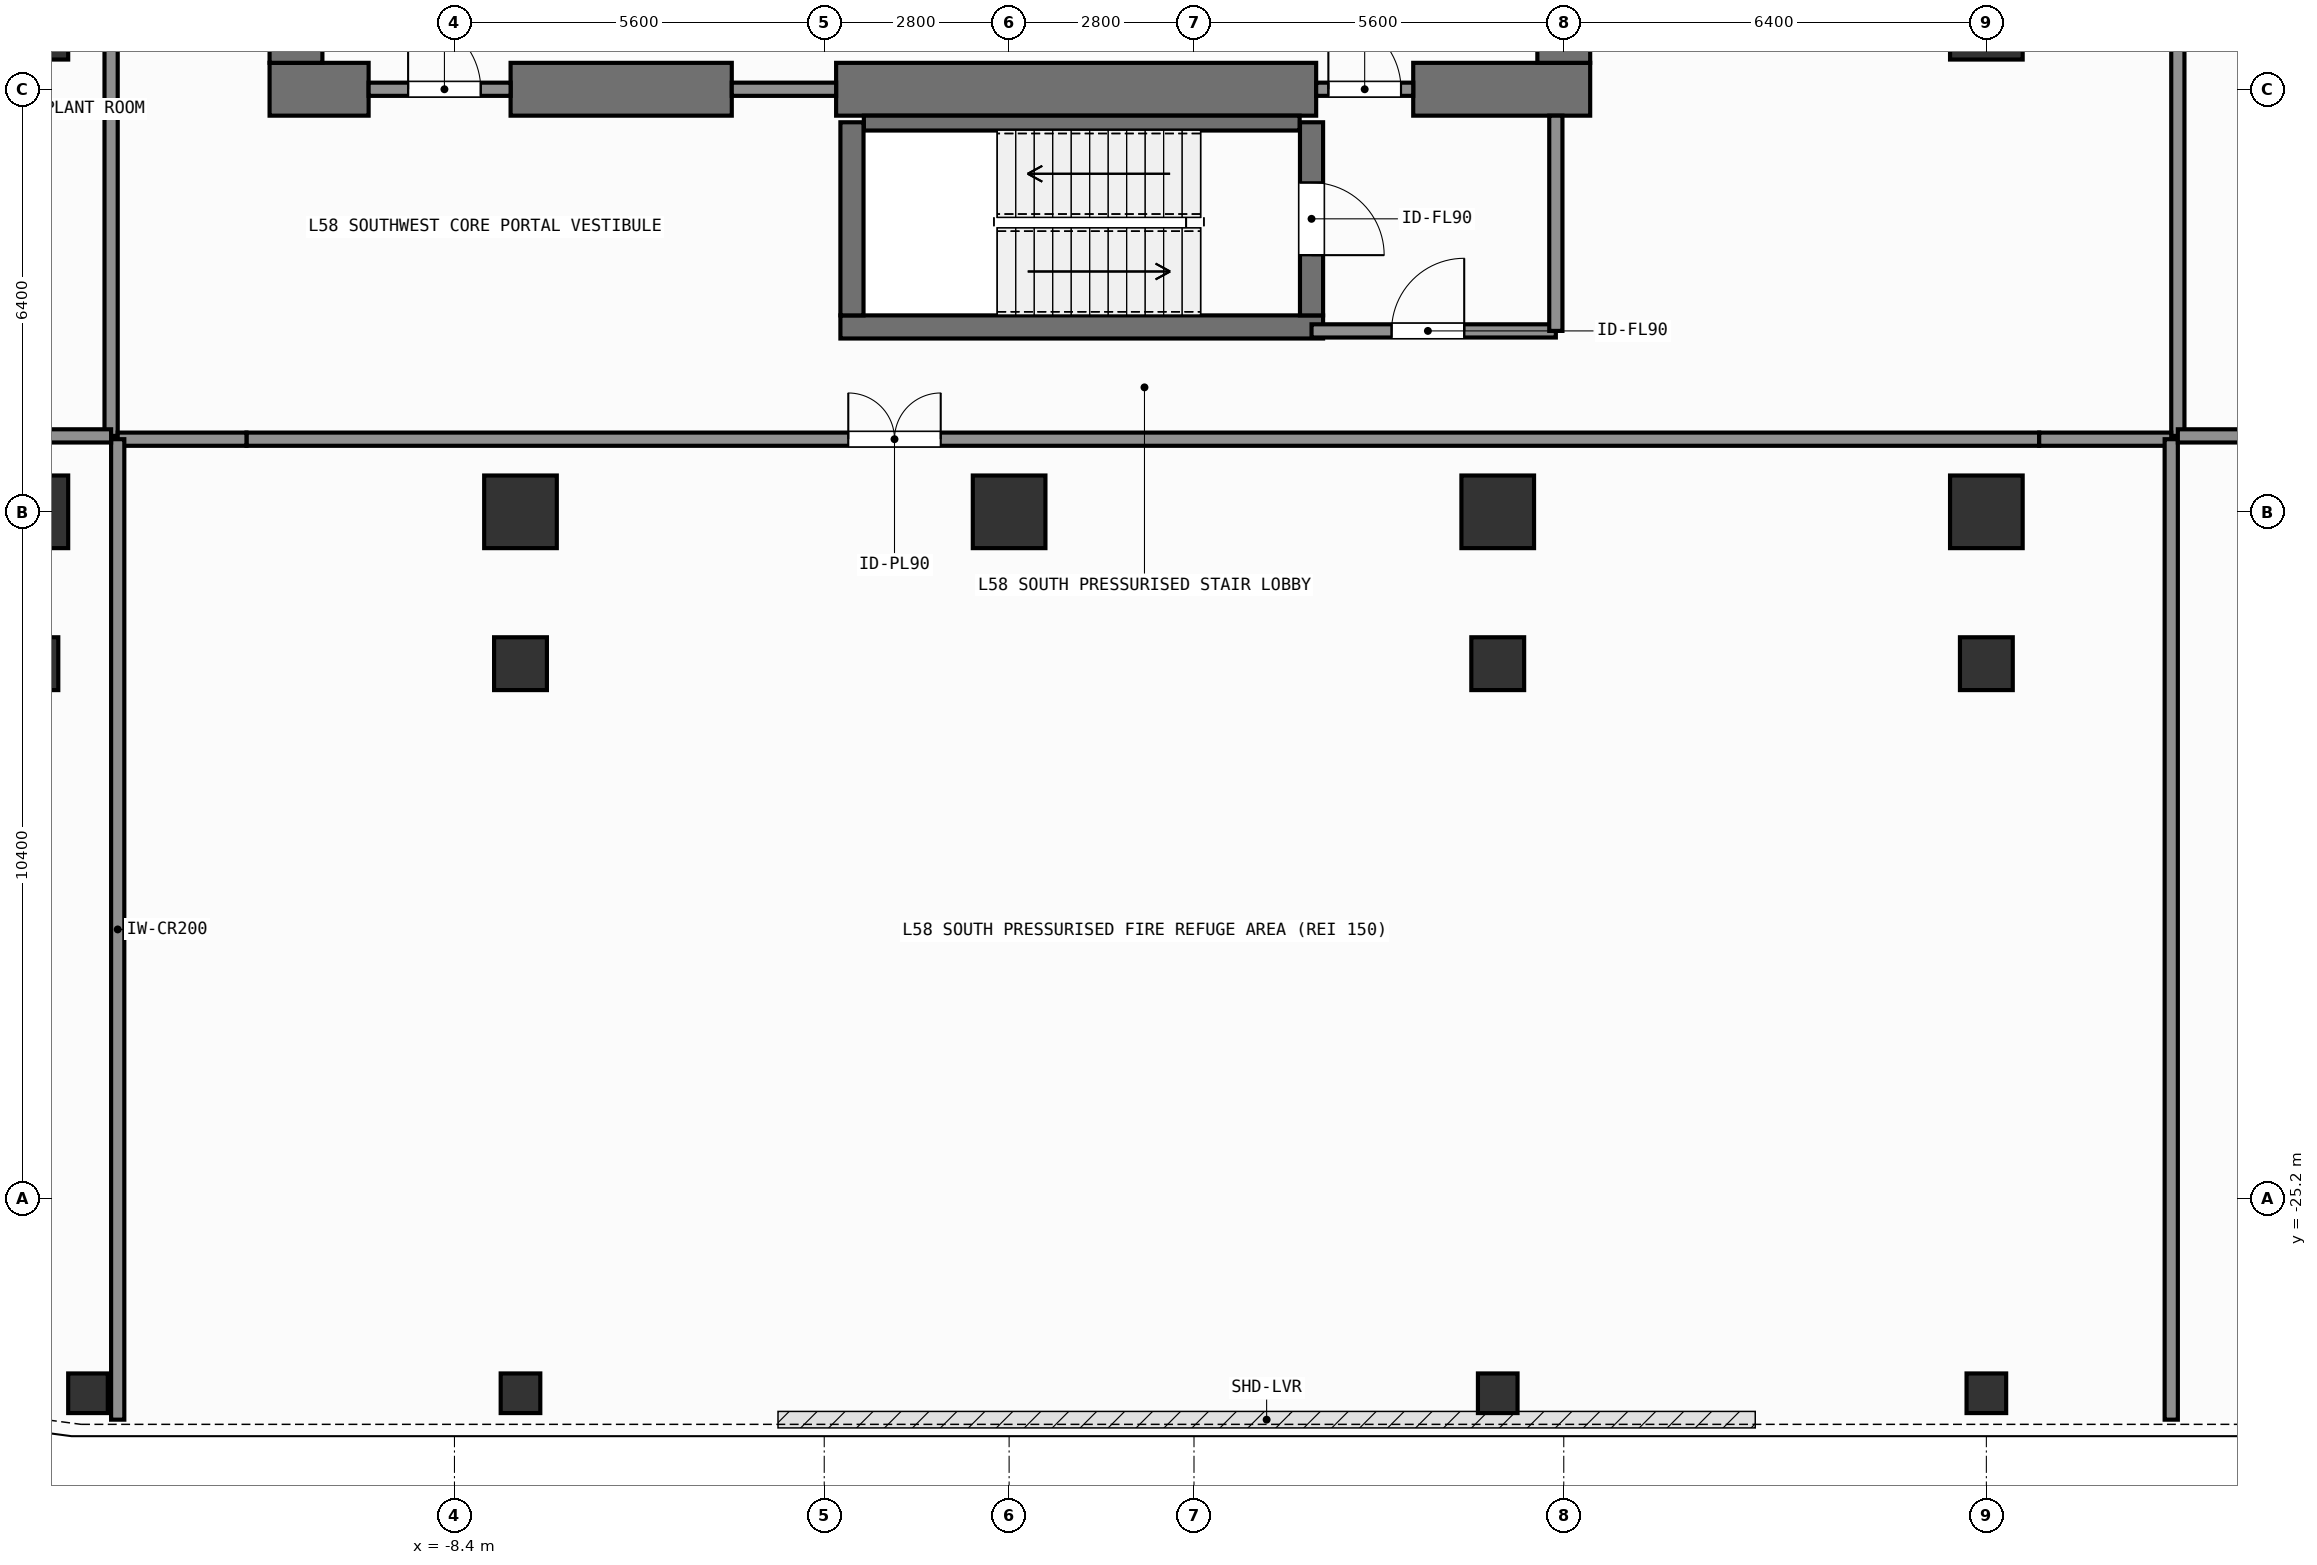
"""IFC4 building model, lengths in metres.
Left out: names, types, materials, properties, quantities, classifications, styles, units other than length and angle.
Written with IfcOpenShell. Run it as: python <this file> out.ifc"""

import sys

from ifc_helpers import new_model, si_unit, direction, frame, frame_2d, origin, origin_2d, place, context, subcontext, project, spatial, rectangle, hollow_rectangle, extrude, element, fill, save


model = new_model("IFC4")
c1 = context("Model", 3, precision=1e-05, world=origin(), true_north=direction((0.0, 1.0)))
c2 = subcontext(c1, "Body", "Model", "MODEL_VIEW")
j1 = project(units=[si_unit("LENGTHUNIT", "METRE"), si_unit("PLANEANGLEUNIT", "RADIAN")], contexts=[c1])
p1 = place(None, origin())
s1 = spatial("IfcSite", under=j1, at=p1, CompositionType="ELEMENT")
p2 = place(p1, origin())
s2 = spatial("IfcBuilding", under=s1, at=p2, CompositionType="ELEMENT")
p3 = place(p2, frame((0.0, 0.0, 235.2)))
s3 = spatial("IfcBuildingStorey", under=s2, at=p3, CompositionType="ELEMENT", Elevation=235.2)
p4 = place(p3, frame((-11.2, -8.4, 0.0), z_axis=(0.0, 0.0, 1.0), x_axis=(1.0, 0.0, 0.0)))
e1 = element("IfcWall", 1, at=p4, inside=s3, PredefinedType="SHEAR", context=c2, shape_type="SweptSolid", body=[
    extrude(rectangle(XDim=1.5, YDim=0.8, at=frame_2d((0.75, 0.0))), origin(), (0.0, 0.0, 1.0), 7.8),
])
p5 = place(p3, frame((-7.55, -8.4, 0.0), z_axis=(0.0, 0.0, 1.0), x_axis=(1.0, 0.0, 0.0)))
e2 = element("IfcWall", 2, at=p5, inside=s3, PredefinedType="SHEAR", context=c2, shape_type="SweptSolid", body=[
    extrude(rectangle(XDim=3.35, YDim=0.8, at=frame_2d((1.675, 0.0))), origin(), (0.0, 0.0, 1.0), 7.8),
])
p6 = place(p3, frame((-2.62, -8.4, 0.0), z_axis=(0.0, 0.0, 1.0), x_axis=(1.0, 0.0, 0.0)))
e3 = element("IfcWall", 3, at=p6, inside=s3, PredefinedType="SHEAR", context=c2, shape_type="SweptSolid", body=[
    extrude(rectangle(XDim=7.27, YDim=0.8, at=frame_2d((3.635, 0.0))), origin(), (0.0, 0.0, 1.0), 7.8),
])
p7 = place(p3, frame((6.12, -8.4, 0.0), z_axis=(0.0, 0.0, 1.0), x_axis=(1.0, 0.0, 0.0)))
e4 = element("IfcWall", 4, at=p7, inside=s3, PredefinedType="SHEAR", context=c2, shape_type="SweptSolid", body=[
    extrude(rectangle(XDim=2.68, YDim=0.8, at=frame_2d((1.34, 0.0))), origin(), (0.0, 0.0, 1.0), 7.8),
])
p8 = place(p3, frame((-10.8, -8.0, 0.0), z_axis=(0.0, 0.0, 1.0), x_axis=(0.0, 1.0, 0.0)))
e5 = element("IfcWall", 5, at=p8, inside=s3, PredefinedType="SHEAR", context=c2, shape_type="SweptSolid", body=[
    extrude(rectangle(XDim=16.0, YDim=0.8, at=frame_2d((8.0, 0.0))), origin(), (0.0, 0.0, 1.0), 7.8),
])
p9 = place(p3, frame((8.4, -8.0, 0.0), z_axis=(0.0, 0.0, 1.0), x_axis=(0.0, 1.0, 0.0)))
e6 = element("IfcWall", 6, at=p9, inside=s3, PredefinedType="SHEAR", context=c2, shape_type="SweptSolid", body=[
    extrude(rectangle(XDim=2.175, YDim=0.8, at=frame_2d((1.087, 0.0))), origin(), (0.0, 0.0, 1.0), 7.8),
])
p10 = place(p3, frame((-2.555, -12.0, 0.0), z_axis=(0.0, 0.0, 1.0), x_axis=(1.0, 0.0, 0.0)))
e7 = element("IfcWall", 7, at=p10, inside=s3, PredefinedType="SHEAR", context=c2, shape_type="SweptSolid", body=[
    extrude(rectangle(XDim=7.31, YDim=0.35, at=frame_2d((3.655, 0.0))), origin(), (0.0, 0.0, 1.0), 7.8),
])
p11 = place(p3, frame((-2.2, -8.913, 0.0), z_axis=(0.0, 0.0, 1.0), x_axis=(1.0, 0.0, 0.0)))
e8 = element("IfcWall", 8, at=p11, inside=s3, PredefinedType="SHEAR", context=c2, shape_type="SweptSolid", body=[
    extrude(rectangle(XDim=6.6, YDim=0.225, at=frame_2d((3.3, 0.0))), origin(), (0.0, 0.0, 1.0), 7.8),
])
p12 = place(p3, frame((-2.38, -11.825, 0.0), z_axis=(0.0, 0.0, 1.0), x_axis=(0.0, 1.0, 0.0)))
e9 = element("IfcWall", 9, at=p12, inside=s3, PredefinedType="SHEAR", context=c2, shape_type="SweptSolid", body=[
    extrude(rectangle(XDim=2.925, YDim=0.35, at=frame_2d((1.462, 0.0))), origin(), (0.0, 0.0, 1.0), 7.8),
])
p13 = place(p3, frame((4.58, -8.9, 0.0), z_axis=(0.0, 0.0, 1.0), x_axis=(0.0, -1.0, 0.0)))
e10 = element("IfcWall", 10, at=p13, inside=s3, PredefinedType="SHEAR", context=c2, shape_type="SweptSolid", body=[
    extrude(rectangle(XDim=2.925, YDim=0.35, at=frame_2d((1.462, 0.0))), origin(), (0.0, 0.0, 1.0), 7.8),
])
p14 = place(p13, frame((0.913, 0.0, 0.0)))
e11 = element("IfcOpeningElement", 11, at=p14, cuts=e10, PredefinedType="OPENING", context=c2, shape_type="SweptSolid", body=[
    extrude(rectangle(XDim=1.1, YDim=2.15, at=frame_2d((0.55, 1.075))), frame((0.0, 0.185, 0.0), z_axis=(0.0, -1.0, 0.0), x_axis=(1.0, 0.0, 0.0)), (0.0, 0.0, 1.0), 0.37),
])
for number, where, z_axis, x_axis in (
    (12, (-14.8, -14.8, 0.0), (0.0, 0.0, 1.0), (1.0, 0.0, 0.0)),
    (13, (-7.4, -14.8, 0.0), (0.0, 0.0, 1.0), (1.0, 0.0, 0.0)),
    (14, (0.0, -14.8, 0.0), (0.0, 0.0, 1.0), (1.0, 0.0, 0.0)),
    (15, (7.4, -14.8, 0.0), (0.0, 0.0, 1.0), (1.0, 0.0, 0.0)),
    (16, (14.8, -14.8, 0.0), (0.0, 0.0, 1.0), (1.0, 0.0, 0.0)),
    (17, (-14.8, -7.4, 0.0), (0.0, 0.0, 1.0), (1.0, 0.0, 0.0)),
    (18, (14.8, -7.4, 0.0), (0.0, 0.0, 1.0), (1.0, 0.0, 0.0)),
):
    element("IfcColumn", number, at=place(p3, frame(where, z_axis=z_axis, x_axis=x_axis)), inside=s3, PredefinedType="COLUMN", context=c2, shape_type="SweptSolid", body=[
        extrude(rectangle(XDim=1.1, YDim=1.1, at=origin_2d()), origin(), (0.0, 0.0, 1.0), 7.8),
    ])
for number, where, z_axis, x_axis in (
    (19, (-14.8, -17.1, 0.0), (0.0, 0.0, 1.0), (1.0, 0.0, 0.0)),
    (20, (-7.4, -17.1, 0.0), (0.0, 0.0, 1.0), (1.0, 0.0, 0.0)),
    (21, (7.4, -17.1, 0.0), (0.0, 0.0, 1.0), (1.0, 0.0, 0.0)),
    (22, (14.8, -17.1, 0.0), (0.0, 0.0, 1.0), (1.0, 0.0, 0.0)),
):
    element("IfcColumn", number, at=place(p3, frame(where, z_axis=z_axis, x_axis=x_axis)), inside=s3, PredefinedType="COLUMN", context=c2, shape_type="SweptSolid", body=[
        extrude(hollow_rectangle(XDim=0.8, YDim=0.8, WallThickness=0.036, at=origin_2d()), origin(), (0.0, 0.0, 1.0), 7.8),
    ])
for number, where, z_axis, x_axis in (
    (23, (-13.95, -28.15, 0.0), (0.0, 0.0, 1.0), (1.0, 0.0, 0.0)),
    (24, (-7.4, -28.15, 0.0), (0.0, 0.0, 1.0), (1.0, 0.0, 0.0)),
    (25, (7.4, -28.15, 0.0), (0.0, 0.0, 1.0), (1.0, 0.0, 0.0)),
    (26, (14.8, -28.15, 0.0), (0.0, 0.0, 1.0), (1.0, 0.0, 0.0)),
):
    element("IfcColumn", number, at=place(p3, frame(where, z_axis=z_axis, x_axis=x_axis)), inside=s3, PredefinedType="COLUMN", context=c2, shape_type="SweptSolid", body=[
        extrude(hollow_rectangle(XDim=0.6, YDim=0.6, WallThickness=0.028, at=origin_2d()), origin(), (0.0, 0.0, 1.0), 7.8),
    ])
p15 = place(p3, frame((4.58, -12.06, 0.0), z_axis=(0.0, 0.0, 1.0), x_axis=(1.0, 0.0, 0.0)))
e27 = element("IfcWall", 27, at=p15, inside=s3, PredefinedType="SOLIDWALL", context=c2, shape_type="SweptSolid", body=[
    extrude(rectangle(XDim=3.7, YDim=0.2, at=frame_2d((1.85, 0.0))), origin(), (0.0, 0.0, 1.0), 7.58),
])
p16 = place(p15, frame((1.212, 0.0, 0.0)))
e28 = element("IfcOpeningElement", 28, at=p16, cuts=e27, PredefinedType="OPENING", context=c2, shape_type="SweptSolid", body=[
    extrude(rectangle(XDim=1.1, YDim=2.15, at=frame_2d((0.55, 1.075))), frame((0.0, 0.11, 0.0), z_axis=(0.0, -1.0, 0.0), x_axis=(1.0, 0.0, 0.0)), (0.0, 0.0, 1.0), 0.22),
])
p17 = place(p3, frame((4.65, -8.4, 0.0), z_axis=(0.0, 0.0, 1.0), x_axis=(1.0, 0.0, 0.0)))
e29 = element("IfcWall", 29, at=p17, inside=s3, PredefinedType="SOLIDWALL", context=c2, shape_type="SweptSolid", body=[
    extrude(rectangle(XDim=1.47, YDim=0.2, at=frame_2d((0.735, 0.0))), origin(), (0.0, 0.0, 1.0), 6.72),
])
p18 = place(p17, frame((0.185, 0.0, 0.0)))
e30 = element("IfcOpeningElement", 30, at=p18, cuts=e29, PredefinedType="OPENING", context=c2, shape_type="SweptSolid", body=[
    extrude(rectangle(XDim=1.1, YDim=2.15, at=frame_2d((0.55, 1.075))), frame((0.0, 0.11, 0.0), z_axis=(0.0, -1.0, 0.0), x_axis=(1.0, 0.0, 0.0)), (0.0, 0.0, 1.0), 0.22),
])
p19 = place(p3, frame((-9.7, -8.4, 0.0), z_axis=(0.0, 0.0, 1.0), x_axis=(1.0, 0.0, 0.0)))
e31 = element("IfcWall", 31, at=p19, inside=s3, PredefinedType="SOLIDWALL", context=c2, shape_type="SweptSolid", body=[
    extrude(rectangle(XDim=2.15, YDim=0.2, at=frame_2d((1.075, 0.0))), origin(), (0.0, 0.0, 1.0), 6.72),
])
p20 = place(p19, frame((0.598, 0.0, 0.0)))
e32 = element("IfcOpeningElement", 32, at=p20, cuts=e31, PredefinedType="OPENING", context=c2, shape_type="SweptSolid", body=[
    extrude(rectangle(XDim=1.1, YDim=2.15, at=frame_2d((0.55, 1.075))), frame((0.0, 0.11, 0.0), z_axis=(0.0, -1.0, 0.0), x_axis=(1.0, 0.0, 0.0)), (0.0, 0.0, 1.0), 0.22),
])
p21 = place(p3, frame((-11.55, -13.7, 0.0), z_axis=(0.0, 0.0, 1.0), x_axis=(1.0, 0.0, 0.0)))
e33 = element("IfcWall", 33, at=p21, inside=s3, PredefinedType="SOLIDWALL", context=c2, shape_type="SweptSolid", body=[
    extrude(rectangle(XDim=27.15, YDim=0.2, at=frame_2d((13.575, 0.0))), origin(), (0.0, 0.0, 1.0), 7.58),
])
p22 = place(p21, frame((9.114, 0.0, 0.0)))
e34 = element("IfcOpeningElement", 34, at=p22, cuts=e33, PredefinedType="OPENING", context=c2, shape_type="SweptSolid", body=[
    extrude(rectangle(XDim=1.4, YDim=2.2, at=frame_2d((0.7, 1.1))), frame((0.0, 0.11, 0.0), z_axis=(0.0, -1.0, 0.0), x_axis=(1.0, 0.0, 0.0)), (0.0, 0.0, 1.0), 0.22),
])
p23 = place(p3, frame((-13.6, -13.65, 0.0), z_axis=(0.0, 0.0, 1.0), x_axis=(0.0, 1.0, 0.0)))
e35 = element("IfcWall", 35, at=p23, inside=s3, PredefinedType="SOLIDWALL", context=c2, shape_type="SweptSolid", body=[
    extrude(rectangle(XDim=13.73, YDim=0.2, at=frame_2d((6.865, 0.0))), origin(), (0.0, 0.0, 1.0), 7.58),
])
p24 = place(p23, frame((6.939, 0.0, 0.0)))
e36 = element("IfcOpeningElement", 36, at=p24, cuts=e35, PredefinedType="OPENING", context=c2, shape_type="SweptSolid", body=[
    extrude(rectangle(XDim=1.1, YDim=2.15, at=frame_2d((0.55, 1.075))), frame((0.0, 0.11, 0.0), z_axis=(0.0, -1.0, 0.0), x_axis=(1.0, 0.0, 0.0)), (0.0, 0.0, 1.0), 0.22),
])
p25 = place(p3, frame((17.7, -13.65, 0.0), z_axis=(0.0, 0.0, 1.0), x_axis=(0.0, 1.0, 0.0)))
e37 = element("IfcWall", 37, at=p25, inside=s3, PredefinedType="SOLIDWALL", context=c2, shape_type="SweptSolid", body=[
    extrude(rectangle(XDim=16.23, YDim=0.2, at=frame_2d((8.115, 0.0))), origin(), (0.0, 0.0, 1.0), 7.58),
])
p26 = place(p25, frame((7.654, 0.0, 0.0)))
e38 = element("IfcOpeningElement", 38, at=p26, cuts=e37, PredefinedType="OPENING", context=c2, shape_type="SweptSolid", body=[
    extrude(rectangle(XDim=1.1, YDim=2.15, at=frame_2d((0.55, 1.075))), frame((0.0, 0.11, 0.0), z_axis=(0.0, -1.0, 0.0), x_axis=(1.0, 0.0, 0.0)), (0.0, 0.0, 1.0), 0.22),
])
p27 = place(p3, frame((8.28, -12.06, 0.0), z_axis=(0.0, 0.0, 1.0), x_axis=(0.0, 1.0, 0.0)))
e39 = element("IfcWall", 39, at=p27, inside=s3, PredefinedType="SOLIDWALL", context=c2, shape_type="SweptSolid", body=[
    extrude(rectangle(XDim=3.26, YDim=0.2, at=frame_2d((1.63, 0.0))), origin(), (0.0, 0.0, 1.0), 7.58),
])
p28 = place(p3, frame((-4.2, -8.4, 0.0), z_axis=(0.0, 0.0, 1.0), x_axis=(1.0, 0.0, 0.0)))
e40 = element("IfcWall", 40, at=p28, inside=s3, PredefinedType="SOLIDWALL", context=c2, shape_type="SweptSolid", body=[
    extrude(rectangle(XDim=1.58, YDim=0.2, at=frame_2d((0.79, 0.0))), origin(), (0.0, 0.0, 1.0), 6.72),
])
p29 = place(p3, frame((-13.5, -13.7, 0.0), z_axis=(0.0, 0.0, 1.0), x_axis=(1.0, 0.0, 0.0)))
e41 = element("IfcWall", 41, at=p29, inside=s3, PredefinedType="SOLIDWALL", context=c2, shape_type="SweptSolid", body=[
    extrude(rectangle(XDim=1.95, YDim=0.2, at=frame_2d((0.975, 0.0))), origin(), (0.0, 0.0, 1.0), 7.58),
])
p30 = place(p3, frame((15.6, -13.7, 0.0), z_axis=(0.0, 0.0, 1.0), x_axis=(1.0, 0.0, 0.0)))
e42 = element("IfcWall", 42, at=p30, inside=s3, PredefinedType="SOLIDWALL", context=c2, shape_type="SweptSolid", body=[
    extrude(rectangle(XDim=2.0, YDim=0.2, at=frame_2d((1.0, 0.0))), origin(), (0.0, 0.0, 1.0), 7.58),
])
for number, where, z_axis, x_axis in (
    (43, (-13.5, -28.55, 0.0), (0.0, 0.0, 1.0), (0.0, 1.0, 0.0)),
    (44, (17.6, -28.55, 0.0), (0.0, 0.0, 1.0), (0.0, 1.0, 0.0)),
):
    element("IfcWall", number, at=place(p3, frame(where, z_axis=z_axis, x_axis=x_axis)), inside=s3, PredefinedType="SOLIDWALL", context=c2, shape_type="SweptSolid", body=[
        extrude(rectangle(XDim=14.85, YDim=0.2, at=frame_2d((7.425, 0.0))), origin(), (0.0, 0.0, 1.0), 7.58),
    ])
p31 = place(p3, frame((-18.25, -13.65, 0.0), z_axis=(0.0, 0.0, 1.0), x_axis=(1.0, 0.0, 0.0)))
e45 = element("IfcWall", 45, at=p31, inside=s3, PredefinedType="SOLIDWALL", context=c2, shape_type="SweptSolid", body=[
    extrude(rectangle(XDim=4.65, YDim=0.2, at=frame_2d((2.325, 0.0))), origin(), (0.0, 0.0, 1.0), 7.58),
])
p32 = place(p3, frame((17.7, -13.65, 0.0), z_axis=(0.0, 0.0, 1.0), x_axis=(1.0, 0.0, 0.0)))
e46 = element("IfcWall", 46, at=p32, inside=s3, PredefinedType="SOLIDWALL", context=c2, shape_type="SweptSolid", body=[
    extrude(rectangle(XDim=8.35, YDim=0.2, at=frame_2d((4.175, 0.0))), origin(), (0.0, 0.0, 1.0), 7.58),
])
p33 = place(p14, origin())
e47 = element("IfcDoor", 47, at=p33, inside=s3, OperationType="SINGLE_SWING_RIGHT", PredefinedType="DOOR", context=c2, shape_type="SweptSolid", body=[
    extrude(rectangle(XDim=1.1, YDim=2.15, at=frame_2d((0.55, 1.075))), frame((0.0, 0.025, 0.0), z_axis=(0.0, -1.0, 0.0), x_axis=(1.0, 0.0, 0.0)), (0.0, 0.0, 1.0), 0.05),
])
fill(e11, e47)
p34 = place(p16, origin())
e48 = element("IfcDoor", 48, at=p34, inside=s3, OperationType="SINGLE_SWING_RIGHT", PredefinedType="DOOR", context=c2, shape_type="SweptSolid", body=[
    extrude(rectangle(XDim=1.1, YDim=2.15, at=frame_2d((0.55, 1.075))), frame((0.0, 0.025, 0.0), z_axis=(0.0, -1.0, 0.0), x_axis=(1.0, 0.0, 0.0)), (0.0, 0.0, 1.0), 0.05),
])
fill(e28, e48)
p35 = place(p18, origin())
e49 = element("IfcDoor", 49, at=p35, inside=s3, OperationType="SINGLE_SWING_LEFT", PredefinedType="DOOR", context=c2, shape_type="SweptSolid", body=[
    extrude(rectangle(XDim=1.1, YDim=2.15, at=frame_2d((0.55, 1.075))), frame((0.0, 0.025, 0.0), z_axis=(0.0, -1.0, 0.0), x_axis=(1.0, 0.0, 0.0)), (0.0, 0.0, 1.0), 0.05),
])
fill(e30, e49)
p36 = place(p20, origin())
e50 = element("IfcDoor", 50, at=p36, inside=s3, OperationType="SINGLE_SWING_LEFT", PredefinedType="DOOR", context=c2, shape_type="SweptSolid", body=[
    extrude(rectangle(XDim=1.1, YDim=2.15, at=frame_2d((0.55, 1.075))), frame((0.0, 0.025, 0.0), z_axis=(0.0, -1.0, 0.0), x_axis=(1.0, 0.0, 0.0)), (0.0, 0.0, 1.0), 0.05),
])
fill(e32, e50)
p37 = place(p22, origin())
e51 = element("IfcDoor", 51, at=p37, inside=s3, OperationType="SINGLE_SWING_LEFT", PredefinedType="DOOR", context=c2, shape_type="SweptSolid", body=[
    extrude(rectangle(XDim=1.4, YDim=2.2, at=frame_2d((0.7, 1.1))), frame((0.0, 0.025, 0.0), z_axis=(0.0, -1.0, 0.0), x_axis=(1.0, 0.0, 0.0)), (0.0, 0.0, 1.0), 0.05),
])
fill(e34, e51)
save(model, sys.argv[1])
